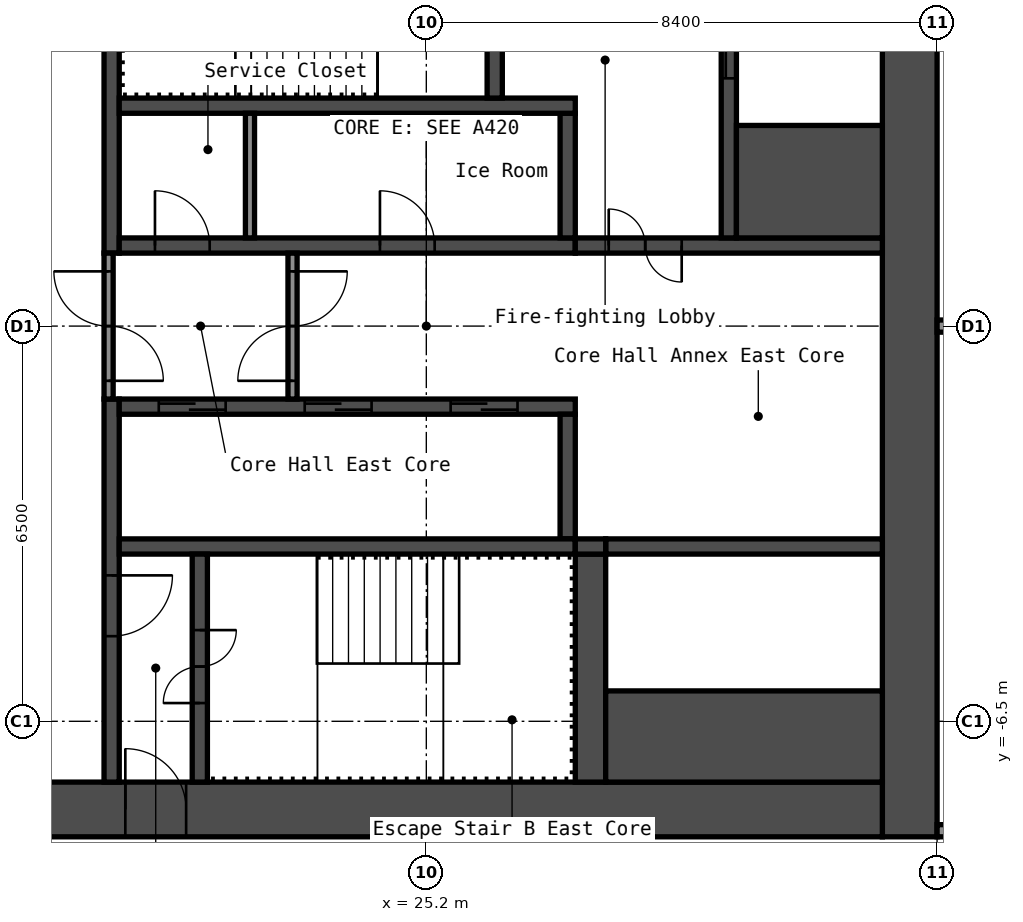
"""IFC4 building model, lengths in metres.
Left out: names, types, materials, properties, quantities, classifications, styles, units other than length and angle.
Written with IfcOpenShell. Run it as: python <this file> out.ifc"""

import sys

from ifc_helpers import new_model, si_unit, direction, frame, frame_2d, origin, place, context, subcontext, project, spatial, rectangle, extrude, element, fill, save


model = new_model("IFC4")
c1 = context("Model", 3, precision=1e-05, world=origin(), true_north=direction((0.0, 1.0)))
c2 = subcontext(c1, "Body", "Model", "MODEL_VIEW")
j1 = project(units=[si_unit("LENGTHUNIT", "METRE"), si_unit("PLANEANGLEUNIT", "RADIAN")], contexts=[c1])
p1 = place(None, origin())
s1 = spatial("IfcSite", under=j1, at=p1, CompositionType="ELEMENT")
p2 = place(p1, origin())
s2 = spatial("IfcBuilding", under=s1, at=p2, CompositionType="ELEMENT")
p3 = place(p2, frame((0.0, 0.0, 131.0)))
s3 = spatial("IfcBuildingStorey", under=s2, at=p3, CompositionType="ELEMENT", Elevation=131.0)
p4 = place(p3, frame((33.15, -8.4, 0.0), z_axis=(0.0, 0.0, 1.0), x_axis=(0.0, 1.0, 0.0)))
e1 = element("IfcWall", 1, at=p4, inside=s3, PredefinedType="SHEAR", context=c2, shape_type="SweptSolid", body=[
    extrude(rectangle(XDim=16.8, YDim=0.9, at=frame_2d((8.4, 0.0))), origin(), (0.0, 0.0, 1.0), 2.75),
])
p5 = place(p3, frame((17.7, -7.95, 0.0), z_axis=(0.0, 0.0, 1.0), x_axis=(1.0, 0.0, 0.0)))
e2 = element("IfcWall", 2, at=p5, inside=s3, PredefinedType="SHEAR", context=c2, shape_type="SweptSolid", body=[
    extrude(rectangle(XDim=15.0, YDim=0.9, at=frame_2d((7.5, 0.0))), origin(), (0.0, 0.0, 1.0), 2.75),
])
p6 = place(p5, frame((2.55, 0.0, 0.0)))
e3 = element("IfcOpeningElement", 3, at=p6, cuts=e2, PredefinedType="OPENING", context=c2, shape_type="SweptSolid", body=[
    extrude(rectangle(XDim=1.0, YDim=2.1, at=frame_2d((0.5, 1.05))), frame((0.0, 0.46, 0.0), z_axis=(0.0, -1.0, 0.0), x_axis=(1.0, 0.0, 0.0)), (0.0, 0.0, 1.0), 0.92),
])
p7 = place(p3, frame((20.025, 1.2, 0.0), z_axis=(0.0, 0.0, 1.0), x_axis=(0.0, 1.0, 0.0)))
e4 = element("IfcWall", 4, at=p7, inside=s3, PredefinedType="SHEAR", context=c2, shape_type="SweptSolid", body=[
    extrude(rectangle(XDim=6.3, YDim=0.25, at=frame_2d((3.15, 0.0))), origin(), (0.0, 0.0, 1.0), 2.75),
])
p8 = place(p3, frame((20.025, -7.5, 0.0), z_axis=(0.0, 0.0, 1.0), x_axis=(0.0, 1.0, 0.0)))
e5 = element("IfcWall", 5, at=p8, inside=s3, PredefinedType="SHEAR", context=c2, shape_type="SweptSolid", body=[
    extrude(rectangle(XDim=6.3, YDim=0.25, at=frame_2d((3.15, 0.0))), origin(), (0.0, 0.0, 1.0), 2.75),
])
p9 = place(p8, frame((2.4, 0.0, 0.0)))
e6 = element("IfcOpeningElement", 6, at=p9, cuts=e5, PredefinedType="OPENING", context=c2, shape_type="SweptSolid", body=[
    extrude(rectangle(XDim=1.0, YDim=2.1, at=frame_2d((0.5, 1.05))), frame((0.0, 0.135, 0.0), z_axis=(0.0, -1.0, 0.0), x_axis=(1.0, 0.0, 0.0)), (0.0, 0.0, 1.0), 0.27),
])
p10 = place(p3, frame((20.15, 1.325, 0.0), z_axis=(0.0, 0.0, 1.0), x_axis=(1.0, 0.0, 0.0)))
e7 = element("IfcWall", 7, at=p10, inside=s3, PredefinedType="SHEAR", context=c2, shape_type="SweptSolid", body=[
    extrude(rectangle(XDim=7.5, YDim=0.25, at=frame_2d((3.75, 0.0))), origin(), (0.0, 0.0, 1.0), 2.75),
])
p11 = place(p10, frame((0.587, 0.0, 0.0)))
e8 = element("IfcOpeningElement", 8, at=p11, cuts=e7, PredefinedType="OPENING", context=c2, shape_type="SweptSolid", body=[
    extrude(rectangle(XDim=0.9, YDim=2.1, at=frame_2d((0.45, 1.05))), frame((0.0, 0.135, 0.0), z_axis=(0.0, -1.0, 0.0), x_axis=(1.0, 0.0, 0.0)), (0.0, 0.0, 1.0), 0.27),
])
p12 = place(p10, frame((4.288, 0.0, 0.0)))
e9 = element("IfcOpeningElement", 9, at=p12, cuts=e7, PredefinedType="OPENING", context=c2, shape_type="SweptSolid", body=[
    extrude(rectangle(XDim=0.9, YDim=2.1, at=frame_2d((0.45, 1.05))), frame((0.0, 0.135, 0.0), z_axis=(0.0, -1.0, 0.0), x_axis=(1.0, 0.0, 0.0)), (0.0, 0.0, 1.0), 0.27),
])
p13 = place(p3, frame((27.525, 1.45, 0.0), z_axis=(0.0, 0.0, 1.0), x_axis=(0.0, 1.0, 0.0)))
e10 = element("IfcWall", 10, at=p13, inside=s3, PredefinedType="SHEAR", context=c2, shape_type="SweptSolid", body=[
    extrude(rectangle(XDim=2.05, YDim=0.25, at=frame_2d((1.025, 0.0))), origin(), (0.0, 0.0, 1.0), 2.75),
])
p14 = place(p3, frame((20.15, 3.625, 0.0), z_axis=(0.0, 0.0, 1.0), x_axis=(1.0, 0.0, 0.0)))
e11 = element("IfcWall", 11, at=p14, inside=s3, PredefinedType="SHEAR", context=c2, shape_type="SweptSolid", body=[
    extrude(rectangle(XDim=7.5, YDim=0.25, at=frame_2d((3.75, 0.0))), origin(), (0.0, 0.0, 1.0), 2.75),
])
p15 = place(p3, frame((26.325, 3.75, 0.0), z_axis=(0.0, 0.0, 1.0), x_axis=(0.0, 1.0, 0.0)))
e12 = element("IfcWall", 12, at=p15, inside=s3, PredefinedType="SHEAR", context=c2, shape_type="SweptSolid", body=[
    extrude(rectangle(XDim=3.75, YDim=0.25, at=frame_2d((1.875, 0.0))), origin(), (0.0, 0.0, 1.0), 2.75),
])
p16 = place(p15, frame((1.25, 0.0, 0.0)))
e13 = element("IfcOpeningElement", 13, at=p16, cuts=e12, PredefinedType="OPENING", context=c2, shape_type="SweptSolid", body=[
    extrude(rectangle(XDim=1.2, YDim=2.1, at=frame_2d((0.6, 1.05))), frame((0.0, 0.135, 0.0), z_axis=(0.0, -1.0, 0.0), x_axis=(1.0, 0.0, 0.0)), (0.0, 0.0, 1.0), 0.27),
])
p17 = place(p3, frame((27.65, 1.325, 0.0), z_axis=(0.0, 0.0, 1.0), x_axis=(1.0, 0.0, 0.0)))
e14 = element("IfcWall", 14, at=p17, inside=s3, PredefinedType="SHEAR", context=c2, shape_type="SweptSolid", body=[
    extrude(rectangle(XDim=5.05, YDim=0.25, at=frame_2d((2.525, 0.0))), origin(), (0.0, 0.0, 1.0), 2.75),
])
p18 = place(p17, frame((0.55, 0.0, 0.0)))
e15 = element("IfcOpeningElement", 15, at=p18, cuts=e14, PredefinedType="OPENING", context=c2, shape_type="SweptSolid", body=[
    extrude(rectangle(XDim=1.2, YDim=2.1, at=frame_2d((0.6, 1.05))), frame((0.0, 0.135, 0.0), z_axis=(0.0, -1.0, 0.0), x_axis=(1.0, 0.0, 0.0)), (0.0, 0.0, 1.0), 0.27),
])
p19 = place(p3, frame((30.175, 1.45, 0.0), z_axis=(0.0, 0.0, 1.0), x_axis=(0.0, 1.0, 0.0)))
e16 = element("IfcWall", 16, at=p19, inside=s3, PredefinedType="SHEAR", context=c2, shape_type="SweptSolid", body=[
    extrude(rectangle(XDim=6.05, YDim=0.25, at=frame_2d((3.025, 0.0))), origin(), (0.0, 0.0, 1.0), 2.75),
])
p20 = place(p19, frame((2.625, 0.0, 0.0)))
e17 = element("IfcOpeningElement", 17, at=p20, cuts=e16, PredefinedType="OPENING", context=c2, shape_type="SweptSolid", body=[
    extrude(rectangle(XDim=1.1, YDim=2.1, at=frame_2d((0.55, 1.05))), frame((0.0, 0.135, 0.0), z_axis=(0.0, -1.0, 0.0), x_axis=(1.0, 0.0, 0.0)), (0.0, 0.0, 1.0), 0.27),
])
p21 = place(p3, frame((30.3, 2.375, 0.0), z_axis=(0.0, 0.0, 1.0), x_axis=(1.0, 0.0, 0.0)))
e18 = element("IfcWall", 18, at=p21, inside=s3, PredefinedType="SHEAR", context=c2, shape_type="SweptSolid", body=[
    extrude(rectangle(XDim=2.4, YDim=1.85, at=frame_2d((1.2, 0.0))), origin(), (0.0, 0.0, 1.0), 2.75),
])
p22 = place(p3, frame((20.15, -1.325, 0.0), z_axis=(0.0, 0.0, 1.0), x_axis=(1.0, 0.0, 0.0)))
e19 = element("IfcWall", 19, at=p22, inside=s3, PredefinedType="SHEAR", context=c2, shape_type="SweptSolid", body=[
    extrude(rectangle(XDim=7.5, YDim=0.25, at=frame_2d((3.75, 0.0))), origin(), (0.0, 0.0, 1.0), 2.75),
])
p23 = place(p22, frame((0.65, 0.0, 0.0)))
e20 = element("IfcOpeningElement", 20, at=p23, cuts=e19, PredefinedType="OPENING", context=c2, shape_type="SweptSolid", body=[
    extrude(rectangle(XDim=1.1, YDim=2.1, at=frame_2d((0.55, 1.05))), frame((0.0, 0.135, 0.0), z_axis=(0.0, -1.0, 0.0), x_axis=(1.0, 0.0, 0.0)), (0.0, 0.0, 1.0), 0.27),
])
p24 = place(p22, frame((3.05, 0.0, 0.0)))
e21 = element("IfcOpeningElement", 21, at=p24, cuts=e19, PredefinedType="OPENING", context=c2, shape_type="SweptSolid", body=[
    extrude(rectangle(XDim=1.1, YDim=2.1, at=frame_2d((0.55, 1.05))), frame((0.0, 0.135, 0.0), z_axis=(0.0, -1.0, 0.0), x_axis=(1.0, 0.0, 0.0)), (0.0, 0.0, 1.0), 0.27),
])
p25 = place(p22, frame((5.45, 0.0, 0.0)))
e22 = element("IfcOpeningElement", 22, at=p25, cuts=e19, PredefinedType="OPENING", context=c2, shape_type="SweptSolid", body=[
    extrude(rectangle(XDim=1.1, YDim=2.1, at=frame_2d((0.55, 1.05))), frame((0.0, 0.135, 0.0), z_axis=(0.0, -1.0, 0.0), x_axis=(1.0, 0.0, 0.0)), (0.0, 0.0, 1.0), 0.27),
])
p26 = place(p3, frame((27.525, -3.5, 0.0), z_axis=(0.0, 0.0, 1.0), x_axis=(0.0, 1.0, 0.0)))
e23 = element("IfcWall", 23, at=p26, inside=s3, PredefinedType="SHEAR", context=c2, shape_type="SweptSolid", body=[
    extrude(rectangle(XDim=2.05, YDim=0.25, at=frame_2d((1.025, 0.0))), origin(), (0.0, 0.0, 1.0), 2.75),
])
p27 = place(p3, frame((20.15, -3.625, 0.0), z_axis=(0.0, 0.0, 1.0), x_axis=(1.0, 0.0, 0.0)))
e24 = element("IfcWall", 24, at=p27, inside=s3, PredefinedType="SHEAR", context=c2, shape_type="SweptSolid", body=[
    extrude(rectangle(XDim=7.5, YDim=0.25, at=frame_2d((3.75, 0.0))), origin(), (0.0, 0.0, 1.0), 2.75),
])
p28 = place(p3, frame((21.475, -7.5, 0.0), z_axis=(0.0, 0.0, 1.0), x_axis=(0.0, 1.0, 0.0)))
e25 = element("IfcWall", 25, at=p28, inside=s3, PredefinedType="SHEAR", context=c2, shape_type="SweptSolid", body=[
    extrude(rectangle(XDim=3.75, YDim=0.25, at=frame_2d((1.875, 0.0))), origin(), (0.0, 0.0, 1.0), 2.75),
])
p29 = place(p28, frame((1.3, 0.0, 0.0)))
e26 = element("IfcOpeningElement", 26, at=p29, cuts=e25, PredefinedType="OPENING", context=c2, shape_type="SweptSolid", body=[
    extrude(rectangle(XDim=1.2, YDim=2.1, at=frame_2d((0.6, 1.05))), frame((0.0, 0.135, 0.0), z_axis=(0.0, -1.0, 0.0), x_axis=(1.0, 0.0, 0.0)), (0.0, 0.0, 1.0), 0.27),
])
p30 = place(p3, frame((27.9, -7.5, 0.0), z_axis=(0.0, 0.0, 1.0), x_axis=(0.0, 1.0, 0.0)))
e27 = element("IfcWall", 27, at=p30, inside=s3, PredefinedType="SHEAR", context=c2, shape_type="SweptSolid", body=[
    extrude(rectangle(XDim=3.75, YDim=0.5, at=frame_2d((1.875, 0.0))), origin(), (0.0, 0.0, 1.0), 2.75),
])
p31 = place(p3, frame((28.15, -3.625, 0.0), z_axis=(0.0, 0.0, 1.0), x_axis=(1.0, 0.0, 0.0)))
e28 = element("IfcWall", 28, at=p31, inside=s3, PredefinedType="SHEAR", context=c2, shape_type="SweptSolid", body=[
    extrude(rectangle(XDim=4.55, YDim=0.25, at=frame_2d((2.275, 0.0))), origin(), (0.0, 0.0, 1.0), 2.75),
])
p32 = place(p3, frame((28.15, -6.75, 0.0), z_axis=(0.0, 0.0, 1.0), x_axis=(1.0, 0.0, 0.0)))
e29 = element("IfcWall", 29, at=p32, inside=s3, PredefinedType="SHEAR", context=c2, shape_type="SweptSolid", body=[
    extrude(rectangle(XDim=4.55, YDim=1.5, at=frame_2d((2.275, 0.0))), origin(), (0.0, 0.0, 1.0), 2.75),
])
p33 = place(p3, frame((27.65, -3.625, 0.0), z_axis=(0.0, 0.0, 1.0), x_axis=(1.0, 0.0, 0.0)))
e30 = element("IfcWall", 30, at=p33, inside=s3, PredefinedType="SHEAR", context=c2, shape_type="SweptSolid", body=[
    extrude(rectangle(XDim=0.5, YDim=0.25, at=frame_2d((0.25, 0.0))), origin(), (0.0, 0.0, 1.0), 2.75),
])
p34 = place(p3, frame((19.975, -1.2, 0.0), z_axis=(0.0, 0.0, 1.0), x_axis=(0.0, 1.0, 0.0)))
e31 = element("IfcWall", 31, at=p34, inside=s3, PredefinedType="PARTITIONING", context=c2, shape_type="SweptSolid", body=[
    extrude(rectangle(XDim=2.4, YDim=0.15, at=frame_2d((1.2, 0.0))), origin(), (0.0, 0.0, 1.0), 2.75),
])
p35 = place(p34, frame((0.3, 0.0, 0.0)))
e32 = element("IfcOpeningElement", 32, at=p35, cuts=e31, PredefinedType="OPENING", context=c2, shape_type="SweptSolid", body=[
    extrude(rectangle(XDim=1.8, YDim=2.1, at=frame_2d((0.9, 1.05))), frame((0.0, 0.085, 0.0), z_axis=(0.0, -1.0, 0.0), x_axis=(1.0, 0.0, 0.0)), (0.0, 0.0, 1.0), 0.17),
])
p36 = place(p3, frame((23.0, -1.2, 0.0), z_axis=(0.0, 0.0, 1.0), x_axis=(0.0, 1.0, 0.0)))
e33 = element("IfcWall", 33, at=p36, inside=s3, PredefinedType="PARTITIONING", context=c2, shape_type="SweptSolid", body=[
    extrude(rectangle(XDim=2.4, YDim=0.15, at=frame_2d((1.2, 0.0))), origin(), (0.0, 0.0, 1.0), 2.75),
])
p37 = place(p36, frame((0.3, 0.0, 0.0)))
e34 = element("IfcOpeningElement", 34, at=p37, cuts=e33, PredefinedType="OPENING", context=c2, shape_type="SweptSolid", body=[
    extrude(rectangle(XDim=1.8, YDim=2.1, at=frame_2d((0.9, 1.05))), frame((0.0, 0.085, 0.0), z_axis=(0.0, -1.0, 0.0), x_axis=(1.0, 0.0, 0.0)), (0.0, 0.0, 1.0), 0.17),
])
p38 = place(p3, frame((22.3, 1.45, 0.0), z_axis=(0.0, 0.0, 1.0), x_axis=(0.0, 1.0, 0.0)))
e35 = element("IfcWall", 35, at=p38, inside=s3, PredefinedType="PARTITIONING", context=c2, shape_type="SweptSolid", body=[
    extrude(rectangle(XDim=2.05, YDim=0.15, at=frame_2d((1.025, 0.0))), origin(), (0.0, 0.0, 1.0), 2.75),
])
p39 = place(p3, frame((33.6, -8.3, 0.0), z_axis=(0.0, 0.0, 1.0), x_axis=(1.0, 0.0, 0.0)))
e36 = element("IfcWall", 36, at=p39, inside=s3, PredefinedType="PARTITIONING", context=c2, shape_type="SweptSolid", body=[
    extrude(rectangle(XDim=6.6, YDim=0.2, at=frame_2d((3.3, 0.0))), origin(), (0.0, 0.0, 1.0), 2.75),
])
p40 = place(p39, frame((0.74, 0.0, 0.0)))
e37 = element("IfcOpeningElement", 37, at=p40, cuts=e36, PredefinedType="OPENING", context=c2, shape_type="SweptSolid", body=[
    extrude(rectangle(XDim=0.9, YDim=2.1, at=frame_2d((0.45, 1.05))), frame((0.0, 0.11, 0.0), z_axis=(0.0, -1.0, 0.0), x_axis=(1.0, 0.0, 0.0)), (0.0, 0.0, 1.0), 0.22),
])
p41 = place(p39, frame((4.04, 0.0, 0.0)))
e38 = element("IfcOpeningElement", 38, at=p41, cuts=e36, PredefinedType="OPENING", context=c2, shape_type="SweptSolid", body=[
    extrude(rectangle(XDim=0.9, YDim=2.1, at=frame_2d((0.45, 1.05))), frame((0.0, 0.11, 0.0), z_axis=(0.0, -1.0, 0.0), x_axis=(1.0, 0.0, 0.0)), (0.0, 0.0, 1.0), 0.22),
])
p42 = place(p3, frame((33.6, 0.0, 0.0), z_axis=(0.0, 0.0, 1.0), x_axis=(1.0, 0.0, 0.0)))
e39 = element("IfcWall", 39, at=p42, inside=s3, PredefinedType="PARTITIONING", context=c2, shape_type="SweptSolid", body=[
    extrude(rectangle(XDim=6.5, YDim=0.2, at=frame_2d((3.25, 0.0))), origin(), (0.0, 0.0, 1.0), 2.75),
])
p43 = place(p6, origin())
e40 = element("IfcDoor", 40, at=p43, inside=s3, OperationType="SINGLE_SWING_RIGHT", PredefinedType="DOOR", context=c2, shape_type="SweptSolid", body=[
    extrude(rectangle(XDim=1.0, YDim=2.1, at=frame_2d((0.5, 1.05))), frame((0.0, 0.025, 0.0), z_axis=(0.0, -1.0, 0.0), x_axis=(1.0, 0.0, 0.0)), (0.0, 0.0, 1.0), 0.05),
])
fill(e3, e40)
p44 = place(p29, origin())
e41 = element("IfcDoor", 41, at=p44, inside=s3, OperationType="DOUBLE_DOOR_SINGLE_SWING", PredefinedType="DOOR", context=c2, shape_type="SweptSolid", body=[
    extrude(rectangle(XDim=1.2, YDim=2.1, at=frame_2d((0.6, 1.05))), frame((0.0, 0.025, 0.0), z_axis=(0.0, -1.0, 0.0), x_axis=(1.0, 0.0, 0.0)), (0.0, 0.0, 1.0), 0.05),
])
fill(e26, e41)
p45 = place(p9, origin())
e42 = element("IfcDoor", 42, at=p45, inside=s3, OperationType="SINGLE_SWING_RIGHT", PredefinedType="DOOR", context=c2, shape_type="SweptSolid", body=[
    extrude(rectangle(XDim=1.0, YDim=2.1, at=frame_2d((0.5, 1.05))), frame((0.0, 0.025, 0.0), z_axis=(0.0, -1.0, 0.0), x_axis=(1.0, 0.0, 0.0)), (0.0, 0.0, 1.0), 0.05),
])
fill(e6, e42)
p46 = place(p18, origin())
e43 = element("IfcDoor", 43, at=p46, inside=s3, OperationType="DOUBLE_DOOR_SINGLE_SWING", PredefinedType="DOOR", context=c2, shape_type="SweptSolid", body=[
    extrude(rectangle(XDim=1.2, YDim=2.1, at=frame_2d((0.6, 1.05))), frame((0.0, 0.025, 0.0), z_axis=(0.0, -1.0, 0.0), x_axis=(1.0, 0.0, 0.0)), (0.0, 0.0, 1.0), 0.05),
])
fill(e15, e43)
p47 = place(p35, origin())
e44 = element("IfcDoor", 44, at=p47, inside=s3, OperationType="DOUBLE_DOOR_SINGLE_SWING", PredefinedType="DOOR", context=c2, shape_type="SweptSolid", body=[
    extrude(rectangle(XDim=1.8, YDim=2.1, at=frame_2d((0.9, 1.05))), frame((0.0, 0.025, 0.0), z_axis=(0.0, -1.0, 0.0), x_axis=(1.0, 0.0, 0.0)), (0.0, 0.0, 1.0), 0.05),
])
fill(e32, e44)
p48 = place(p37, origin())
e45 = element("IfcDoor", 45, at=p48, inside=s3, OperationType="DOUBLE_DOOR_SINGLE_SWING", PredefinedType="DOOR", context=c2, shape_type="SweptSolid", body=[
    extrude(rectangle(XDim=1.8, YDim=2.1, at=frame_2d((0.9, 1.05))), frame((0.0, 0.025, 0.0), z_axis=(0.0, -1.0, 0.0), x_axis=(1.0, 0.0, 0.0)), (0.0, 0.0, 1.0), 0.05),
])
fill(e34, e45)
p49 = place(p11, origin())
e46 = element("IfcDoor", 46, at=p49, inside=s3, OperationType="SINGLE_SWING_RIGHT", PredefinedType="DOOR", context=c2, shape_type="SweptSolid", body=[
    extrude(rectangle(XDim=0.9, YDim=2.1, at=frame_2d((0.45, 1.05))), frame((0.0, 0.025, 0.0), z_axis=(0.0, -1.0, 0.0), x_axis=(1.0, 0.0, 0.0)), (0.0, 0.0, 1.0), 0.05),
])
fill(e8, e46)
p50 = place(p12, origin())
e47 = element("IfcDoor", 47, at=p50, inside=s3, OperationType="SINGLE_SWING_RIGHT", PredefinedType="DOOR", context=c2, shape_type="SweptSolid", body=[
    extrude(rectangle(XDim=0.9, YDim=2.1, at=frame_2d((0.45, 1.05))), frame((0.0, 0.025, 0.0), z_axis=(0.0, -1.0, 0.0), x_axis=(1.0, 0.0, 0.0)), (0.0, 0.0, 1.0), 0.05),
])
fill(e9, e47)
p51 = place(p23, origin())
e48 = element("IfcDoor", 48, at=p51, inside=s3, OperationType="DOUBLE_DOOR_SLIDING", PredefinedType="DOOR", context=c2, shape_type="SweptSolid", body=[
    extrude(rectangle(XDim=1.1, YDim=2.1, at=frame_2d((0.55, 1.05))), frame((0.0, 0.025, 0.0), z_axis=(0.0, -1.0, 0.0), x_axis=(1.0, 0.0, 0.0)), (0.0, 0.0, 1.0), 0.05),
])
fill(e20, e48)
p52 = place(p24, origin())
e49 = element("IfcDoor", 49, at=p52, inside=s3, OperationType="DOUBLE_DOOR_SLIDING", PredefinedType="DOOR", context=c2, shape_type="SweptSolid", body=[
    extrude(rectangle(XDim=1.1, YDim=2.1, at=frame_2d((0.55, 1.05))), frame((0.0, 0.025, 0.0), z_axis=(0.0, -1.0, 0.0), x_axis=(1.0, 0.0, 0.0)), (0.0, 0.0, 1.0), 0.05),
])
fill(e21, e49)
p53 = place(p25, origin())
e50 = element("IfcDoor", 50, at=p53, inside=s3, OperationType="DOUBLE_DOOR_SLIDING", PredefinedType="DOOR", context=c2, shape_type="SweptSolid", body=[
    extrude(rectangle(XDim=1.1, YDim=2.1, at=frame_2d((0.55, 1.05))), frame((0.0, 0.025, 0.0), z_axis=(0.0, -1.0, 0.0), x_axis=(1.0, 0.0, 0.0)), (0.0, 0.0, 1.0), 0.05),
])
fill(e22, e50)
p54 = place(p20, origin())
e51 = element("IfcDoor", 51, at=p54, inside=s3, OperationType="DOUBLE_DOOR_SLIDING", PredefinedType="DOOR", context=c2, shape_type="SweptSolid", body=[
    extrude(rectangle(XDim=1.1, YDim=2.1, at=frame_2d((0.55, 1.05))), frame((0.0, 0.025, 0.0), z_axis=(0.0, -1.0, 0.0), x_axis=(1.0, 0.0, 0.0)), (0.0, 0.0, 1.0), 0.05),
])
fill(e17, e51)
save(model, sys.argv[1])
